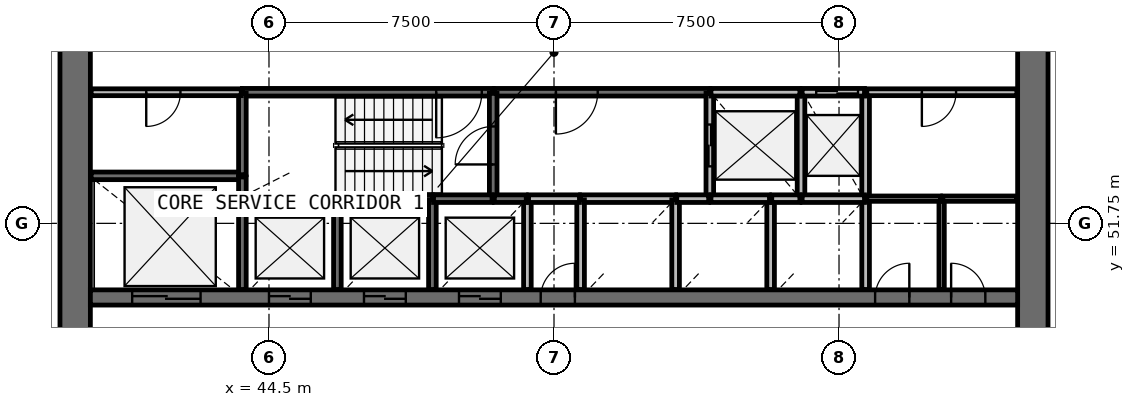
"""IFC4 building model, lengths in metres.
Left out: names, types, materials, properties, quantities, classifications, styles, units other than length and angle.
Written with IfcOpenShell. Run it as: python <this file> out.ifc"""

import sys

from ifc_helpers import new_model, si_unit, direction, frame, frame_2d, origin, place, context, subcontext, project, spatial, rectangle, extrude, source, transform, mapped, element, fill, save


model = new_model("IFC4")
c1 = context("Model", 3, precision=1e-05, world=origin(), true_north=direction((0.0, 1.0)))
c2 = subcontext(c1, "Body", "Model", "MODEL_VIEW")
j1 = project(units=[si_unit("LENGTHUNIT", "METRE"), si_unit("PLANEANGLEUNIT", "RADIAN")], contexts=[c1])
p1 = place(None, origin())
s1 = spatial("IfcSite", under=j1, at=p1, CompositionType="ELEMENT")
p2 = place(p1, origin())
s2 = spatial("IfcBuilding", under=s1, at=p2, CompositionType="ELEMENT")
p3 = place(p2, frame((0.0, 0.0, 92.1)))
s3 = spatial("IfcBuildingStorey", under=s2, at=p3, CompositionType="ELEMENT", Elevation=92.1)
p4 = place(p3, frame((64.6, 38.0, 0.0), z_axis=(0.0, 0.0, 1.0), x_axis=(0.0, 1.0, 0.0)))
e1 = element("IfcWall", 1, at=p4, inside=s3, PredefinedType="SHEAR", context=c2, shape_type="SweptSolid", body=[
    extrude(rectangle(XDim=20.0, YDim=0.8, at=frame_2d((10.0, 0.0))), origin(), (0.0, 0.0, 1.0), 4.1),
])
p5 = place(p4, frame((9.1, 0.0, 0.0)))
e2 = element("IfcOpeningElement", 2, at=p5, cuts=e1, PredefinedType="OPENING", context=c2, shape_type="SweptSolid", body=[
    extrude(rectangle(XDim=1.8, YDim=2.1, at=frame_2d((0.9, 1.05))), frame((0.0, 0.41, 0.0), z_axis=(0.0, -1.0, 0.0), x_axis=(1.0, 0.0, 0.0)), (0.0, 0.0, 1.0), 0.82),
])
p6 = place(p3, frame((39.4, 58.0, 0.0), z_axis=(0.0, 0.0, 1.0), x_axis=(0.0, -1.0, 0.0)))
e3 = element("IfcWall", 3, at=p6, inside=s3, PredefinedType="SHEAR", context=c2, shape_type="SweptSolid", body=[
    extrude(rectangle(XDim=20.0, YDim=0.8, at=frame_2d((10.0, 0.0))), origin(), (0.0, 0.0, 1.0), 4.1),
])
p7 = place(p6, frame((9.1, 0.0, 0.0)))
e4 = element("IfcOpeningElement", 4, at=p7, cuts=e3, PredefinedType="OPENING", context=c2, shape_type="SweptSolid", body=[
    extrude(rectangle(XDim=1.8, YDim=2.1, at=frame_2d((0.9, 1.05))), frame((0.0, 0.41, 0.0), z_axis=(0.0, -1.0, 0.0), x_axis=(1.0, 0.0, 0.0)), (0.0, 0.0, 1.0), 0.82),
])
p8 = place(p3, frame((39.8, 49.8, 0.0), z_axis=(0.0, 0.0, 1.0), x_axis=(1.0, 0.0, 0.0)))
e5 = element("IfcWall", 5, at=p8, inside=s3, PredefinedType="SHEAR", context=c2, shape_type="SweptSolid", body=[
    extrude(rectangle(XDim=24.4, YDim=0.4, at=frame_2d((12.2, 0.0))), origin(), (0.0, 0.0, 1.0), 4.1),
])
p9 = place(p8, frame((4.7, 0.0, 0.0)))
e6 = element("IfcOpeningElement", 6, at=p9, cuts=e5, PredefinedType="OPENING", context=c2, shape_type="SweptSolid", body=[
    extrude(rectangle(XDim=1.1, YDim=2.1, at=frame_2d((0.55, 1.05))), frame((0.0, 0.21, 0.0), z_axis=(0.0, -1.0, 0.0), x_axis=(1.0, 0.0, 0.0)), (0.0, 0.0, 1.0), 0.42),
])
p10 = place(p8, frame((7.2, 0.0, 0.0)))
e7 = element("IfcOpeningElement", 7, at=p10, cuts=e5, PredefinedType="OPENING", context=c2, shape_type="SweptSolid", body=[
    extrude(rectangle(XDim=1.1, YDim=2.1, at=frame_2d((0.55, 1.05))), frame((0.0, 0.21, 0.0), z_axis=(0.0, -1.0, 0.0), x_axis=(1.0, 0.0, 0.0)), (0.0, 0.0, 1.0), 0.42),
])
p11 = place(p8, frame((9.7, 0.0, 0.0)))
e8 = element("IfcOpeningElement", 8, at=p11, cuts=e5, PredefinedType="OPENING", context=c2, shape_type="SweptSolid", body=[
    extrude(rectangle(XDim=1.1, YDim=2.1, at=frame_2d((0.55, 1.05))), frame((0.0, 0.21, 0.0), z_axis=(0.0, -1.0, 0.0), x_axis=(1.0, 0.0, 0.0)), (0.0, 0.0, 1.0), 0.42),
])
p12 = place(p8, frame((1.1, 0.0, 0.0)))
e9 = element("IfcOpeningElement", 9, at=p12, cuts=e5, PredefinedType="OPENING", context=c2, shape_type="SweptSolid", body=[
    extrude(rectangle(XDim=1.8, YDim=2.4, at=frame_2d((0.9, 1.2))), frame((0.0, 0.21, 0.0), z_axis=(0.0, -1.0, 0.0), x_axis=(1.0, 0.0, 0.0)), (0.0, 0.0, 1.0), 0.42),
])
p13 = place(p8, frame((20.65, 0.0, 0.0)))
e10 = element("IfcOpeningElement", 10, at=p13, cuts=e5, PredefinedType="OPENING", context=c2, shape_type="SweptSolid", body=[
    extrude(rectangle(XDim=0.9, YDim=2.1, at=frame_2d((0.45, 1.05))), frame((0.0, 0.21, 0.0), z_axis=(0.0, -1.0, 0.0), x_axis=(1.0, 0.0, 0.0)), (0.0, 0.0, 1.0), 0.42),
])
p14 = place(p8, frame((22.65, 0.0, 0.0)))
e11 = element("IfcOpeningElement", 11, at=p14, cuts=e5, PredefinedType="OPENING", context=c2, shape_type="SweptSolid", body=[
    extrude(rectangle(XDim=0.9, YDim=2.1, at=frame_2d((0.45, 1.05))), frame((0.0, 0.21, 0.0), z_axis=(0.0, -1.0, 0.0), x_axis=(1.0, 0.0, 0.0)), (0.0, 0.0, 1.0), 0.42),
])
p15 = place(p8, frame((11.85, 0.0, 0.0)))
e12 = element("IfcOpeningElement", 12, at=p15, cuts=e5, PredefinedType="OPENING", context=c2, shape_type="SweptSolid", body=[
    extrude(rectangle(XDim=0.9, YDim=2.1, at=frame_2d((0.45, 1.05))), frame((0.0, 0.21, 0.0), z_axis=(0.0, -1.0, 0.0), x_axis=(1.0, 0.0, 0.0)), (0.0, 0.0, 1.0), 0.42),
])
p16 = place(p3, frame((50.4, 55.2, 0.0), z_axis=(0.0, 0.0, 1.0), x_axis=(-1.0, 0.0, 0.0)))
e13 = element("IfcWall", 13, at=p16, inside=s3, PredefinedType="SOLIDWALL", context=c2, shape_type="SweptSolid", body=[
    extrude(rectangle(XDim=6.6, YDim=0.2, at=frame_2d((3.3, 0.0))), origin(), (0.0, 0.0, 1.0), 3.7),
])
p17 = place(p16, frame((0.3, 0.0, 0.0)))
e14 = element("IfcOpeningElement", 14, at=p17, cuts=e13, PredefinedType="OPENING", context=c2, shape_type="SweptSolid", body=[
    extrude(rectangle(XDim=1.2, YDim=2.1, at=frame_2d((0.6, 1.05))), frame((0.0, 0.11, 0.0), z_axis=(0.0, -1.0, 0.0), x_axis=(1.0, 0.0, 0.0)), (0.0, 0.0, 1.0), 0.22),
])
p18 = place(p3, frame((56.1, 55.2, 0.0), z_axis=(0.0, 0.0, 1.0), x_axis=(-1.0, 0.0, 0.0)))
e15 = element("IfcWall", 15, at=p18, inside=s3, PredefinedType="SOLIDWALL", context=c2, shape_type="SweptSolid", body=[
    extrude(rectangle(XDim=5.67, YDim=0.2, at=frame_2d((2.835, 0.0))), origin(), (0.0, 0.0, 1.0), 3.7),
])
p19 = place(p18, frame((2.95, 0.0, 0.0)))
e16 = element("IfcOpeningElement", 16, at=p19, cuts=e15, PredefinedType="OPENING", context=c2, shape_type="SweptSolid", body=[
    extrude(rectangle(XDim=1.1, YDim=2.1, at=frame_2d((0.55, 1.05))), frame((0.0, 0.11, 0.0), z_axis=(0.0, -1.0, 0.0), x_axis=(1.0, 0.0, 0.0)), (0.0, 0.0, 1.0), 0.22),
])
p20 = place(p3, frame((43.8, 53.0, 0.0), z_axis=(0.0, 0.0, 1.0), x_axis=(-1.0, 0.0, 0.0)))
e17 = element("IfcWall", 17, at=p20, inside=s3, PredefinedType="SOLIDWALL", context=c2, shape_type="SweptSolid", body=[
    extrude(rectangle(XDim=3.98, YDim=0.2, at=frame_2d((1.99, 0.0))), origin(), (0.0, 0.0, 1.0), 3.7),
])
p21 = place(p3, frame((50.4, 52.4, 0.0), z_axis=(0.0, 0.0, 1.0), x_axis=(0.0, 1.0, 0.0)))
e18 = element("IfcWall", 18, at=p21, inside=s3, PredefinedType="SOLIDWALL", context=c2, shape_type="SweptSolid", body=[
    extrude(rectangle(XDim=2.77, YDim=0.2, at=frame_2d((1.385, 0.0))), origin(), (0.0, 0.0, 1.0), 3.7),
])
p22 = place(p21, frame((0.9, 0.0, 0.0)))
e19 = element("IfcOpeningElement", 19, at=p22, cuts=e18, PredefinedType="OPENING", context=c2, shape_type="SweptSolid", body=[
    extrude(rectangle(XDim=1.0, YDim=2.1, at=frame_2d((0.5, 1.05))), frame((0.0, 0.11, 0.0), z_axis=(0.0, -1.0, 0.0), x_axis=(1.0, 0.0, 0.0)), (0.0, 0.0, 1.0), 0.22),
])
p23 = place(p3, frame((56.1, 55.17, 0.0), z_axis=(0.0, 0.0, 1.0), x_axis=(0.0, -1.0, 0.0)))
e20 = element("IfcWall", 20, at=p23, inside=s3, PredefinedType="SOLIDWALL", context=c2, shape_type="SweptSolid", body=[
    extrude(rectangle(XDim=2.77, YDim=0.2, at=frame_2d((1.385, 0.0))), origin(), (0.0, 0.0, 1.0), 3.7),
])
p24 = place(p23, frame((0.82, 0.0, 0.0)))
e21 = element("IfcOpeningElement", 21, at=p24, cuts=e20, PredefinedType="OPENING", context=c2, shape_type="SweptSolid", body=[
    extrude(rectangle(XDim=1.1, YDim=2.1, at=frame_2d((0.55, 1.05))), frame((0.0, 0.11, 0.0), z_axis=(0.0, -1.0, 0.0), x_axis=(1.0, 0.0, 0.0)), (0.0, 0.0, 1.0), 0.22),
])
for number, where, z_axis, x_axis in (
    (22, (58.5, 52.4, 0.0), (0.0, 0.0, 1.0), (0.0, 1.0, 0.0)),
    (23, (60.2, 52.4, 0.0), (0.0, 0.0, 1.0), (0.0, 1.0, 0.0)),
):
    element("IfcWall", number, at=place(p3, frame(where, z_axis=z_axis, x_axis=x_axis)), inside=s3, PredefinedType="SOLIDWALL", context=c2, shape_type="SweptSolid", body=[
        extrude(rectangle(XDim=2.8, YDim=0.2, at=frame_2d((1.4, 0.0))), origin(), (0.0, 0.0, 1.0), 3.7),
    ])
p25 = place(p3, frame((46.3, 52.4, 0.0), z_axis=(0.0, 0.0, 1.0), x_axis=(-1.0, 0.0, 0.0)))
e24 = element("IfcWall", 24, at=p25, inside=s3, PredefinedType="SOLIDWALL", context=c2, shape_type="SweptSolid", body=[
    extrude(rectangle(XDim=2.5, YDim=0.2, at=frame_2d((1.25, 0.0))), origin(), (0.0, 0.0, 1.0), 3.7),
])
p26 = place(p3, frame((48.8, 52.4, 0.0), z_axis=(0.0, 0.0, 1.0), x_axis=(-1.0, 0.0, 0.0)))
e25 = element("IfcWall", 25, at=p26, inside=s3, PredefinedType="SOLIDWALL", context=c2, shape_type="SweptSolid", body=[
    extrude(rectangle(XDim=2.47, YDim=0.2, at=frame_2d((1.235, 0.0))), origin(), (0.0, 0.0, 1.0), 3.7),
])
p27 = place(p3, frame((55.2, 52.4, 0.0), z_axis=(0.0, 0.0, 1.0), x_axis=(-1.0, 0.0, 0.0)))
e26 = element("IfcWall", 26, at=p27, inside=s3, PredefinedType="SOLIDWALL", context=c2, shape_type="SweptSolid", body=[
    extrude(rectangle(XDim=2.5, YDim=0.2, at=frame_2d((1.25, 0.0))), origin(), (0.0, 0.0, 1.0), 3.7),
])
p28 = place(p3, frame((58.47, 55.2, 0.0), z_axis=(0.0, 0.0, 1.0), x_axis=(-1.0, 0.0, 0.0)))
e27 = element("IfcWall", 27, at=p28, inside=s3, PredefinedType="SOLIDWALL", context=c2, shape_type="SweptSolid", body=[
    extrude(rectangle(XDim=2.34, YDim=0.2, at=frame_2d((1.17, 0.0))), origin(), (0.0, 0.0, 1.0), 3.7),
])
for number, where, z_axis, x_axis in (
    (28, (43.8, 52.37, 0.0), (0.0, 0.0, 1.0), (0.0, -1.0, 0.0)),
    (29, (46.3, 50.01, 0.0), (0.0, 0.0, 1.0), (0.0, 1.0, 0.0)),
    (30, (48.8, 50.01, 0.0), (0.0, 0.0, 1.0), (0.0, 1.0, 0.0)),
):
    element("IfcWall", number, at=place(p3, frame(where, z_axis=z_axis, x_axis=x_axis)), inside=s3, PredefinedType="SOLIDWALL", context=c2, shape_type="SweptSolid", body=[
        extrude(rectangle(XDim=2.36, YDim=0.2, at=frame_2d((1.18, 0.0))), origin(), (0.0, 0.0, 1.0), 3.7),
    ])
p29 = place(p3, frame((51.3, 50.01, 0.0), z_axis=(0.0, 0.0, 1.0), x_axis=(0.0, 1.0, 0.0)))
e31 = element("IfcWall", 31, at=p29, inside=s3, PredefinedType="SOLIDWALL", context=c2, shape_type="SweptSolid", body=[
    extrude(rectangle(XDim=2.39, YDim=0.2, at=frame_2d((1.195, 0.0))), origin(), (0.0, 0.0, 1.0), 3.7),
])
for number, where, z_axis, x_axis in (
    (32, (52.7, 52.37, 0.0), (0.0, 0.0, 1.0), (0.0, -1.0, 0.0)),
    (33, (55.2, 50.01, 0.0), (0.0, 0.0, 1.0), (0.0, 1.0, 0.0)),
):
    element("IfcWall", number, at=place(p3, frame(where, z_axis=z_axis, x_axis=x_axis)), inside=s3, PredefinedType="SOLIDWALL", context=c2, shape_type="SweptSolid", body=[
        extrude(rectangle(XDim=2.36, YDim=0.2, at=frame_2d((1.18, 0.0))), origin(), (0.0, 0.0, 1.0), 3.7),
    ])
p30 = place(p3, frame((57.7, 50.01, 0.0), z_axis=(0.0, 0.0, 1.0), x_axis=(0.0, 1.0, 0.0)))
e34 = element("IfcWall", 34, at=p30, inside=s3, PredefinedType="SOLIDWALL", context=c2, shape_type="SweptSolid", body=[
    extrude(rectangle(XDim=2.39, YDim=0.2, at=frame_2d((1.195, 0.0))), origin(), (0.0, 0.0, 1.0), 3.7),
])
p31 = place(p3, frame((60.2, 50.01, 0.0), z_axis=(0.0, 0.0, 1.0), x_axis=(0.0, 1.0, 0.0)))
e35 = element("IfcWall", 35, at=p31, inside=s3, PredefinedType="SOLIDWALL", context=c2, shape_type="SweptSolid", body=[
    extrude(rectangle(XDim=2.36, YDim=0.2, at=frame_2d((1.18, 0.0))), origin(), (0.0, 0.0, 1.0), 3.7),
])
p32 = place(p3, frame((43.8, 55.17, 0.0), z_axis=(0.0, 0.0, 1.0), x_axis=(0.0, -1.0, 0.0)))
e36 = element("IfcWall", 36, at=p32, inside=s3, PredefinedType="SOLIDWALL", context=c2, shape_type="SweptSolid", body=[
    extrude(rectangle(XDim=2.14, YDim=0.2, at=frame_2d((1.07, 0.0))), origin(), (0.0, 0.0, 1.0), 3.7),
])
p33 = place(p3, frame((60.17, 52.4, 0.0), z_axis=(0.0, 0.0, 1.0), x_axis=(-1.0, 0.0, 0.0)))
e37 = element("IfcWall", 37, at=p33, inside=s3, PredefinedType="SOLIDWALL", context=c2, shape_type="SweptSolid", body=[
    extrude(rectangle(XDim=1.64, YDim=0.2, at=frame_2d((0.82, 0.0))), origin(), (0.0, 0.0, 1.0), 3.7),
])
p34 = place(p3, frame((60.17, 55.2, 0.0), z_axis=(0.0, 0.0, 1.0), x_axis=(-1.0, 0.0, 0.0)))
e38 = element("IfcWall", 38, at=p34, inside=s3, PredefinedType="SOLIDWALL", context=c2, shape_type="SweptSolid", body=[
    extrude(rectangle(XDim=1.64, YDim=0.2, at=frame_2d((0.82, 0.0))), origin(), (0.0, 0.0, 1.0), 3.7),
])
p35 = place(p34, frame((0.17, 0.0, 0.0)))
e39 = element("IfcOpeningElement", 39, at=p35, cuts=e38, PredefinedType="OPENING", context=c2, shape_type="SweptSolid", body=[
    extrude(rectangle(XDim=1.1, YDim=2.1, at=frame_2d((0.55, 1.05))), frame((0.0, 0.11, 0.0), z_axis=(0.0, -1.0, 0.0), x_axis=(1.0, 0.0, 0.0)), (0.0, 0.0, 1.0), 0.22),
])
for number, where, z_axis, x_axis in (
    (40, (50.37, 52.4, 0.0), (0.0, 0.0, 1.0), (-1.0, 0.0, 0.0)),
    (41, (57.67, 52.4, 0.0), (0.0, 0.0, 1.0), (-1.0, 0.0, 0.0)),
):
    element("IfcWall", number, at=place(p3, frame(where, z_axis=z_axis, x_axis=x_axis)), inside=s3, PredefinedType="SOLIDWALL", context=c2, shape_type="SweptSolid", body=[
        extrude(rectangle(XDim=1.54, YDim=0.2, at=frame_2d((0.77, 0.0))), origin(), (0.0, 0.0, 1.0), 3.7),
    ])
p36 = place(p3, frame((51.33, 52.4, 0.0), z_axis=(0.0, 0.0, 1.0), x_axis=(1.0, 0.0, 0.0)))
e42 = element("IfcWall", 42, at=p36, inside=s3, PredefinedType="SOLIDWALL", context=c2, shape_type="SweptSolid", body=[
    extrude(rectangle(XDim=1.34, YDim=0.2, at=frame_2d((0.67, 0.0))), origin(), (0.0, 0.0, 1.0), 3.7),
])
for number, where, z_axis, x_axis in (
    (43, (51.27, 52.4, 0.0), (0.0, 0.0, 1.0), (-1.0, 0.0, 0.0)),
    (44, (56.07, 52.4, 0.0), (0.0, 0.0, 1.0), (-1.0, 0.0, 0.0)),
):
    element("IfcWall", number, at=place(p3, frame(where, z_axis=z_axis, x_axis=x_axis)), inside=s3, PredefinedType="SOLIDWALL", context=c2, shape_type="SweptSolid", body=[
        extrude(rectangle(XDim=0.84, YDim=0.2, at=frame_2d((0.42, 0.0))), origin(), (0.0, 0.0, 1.0), 3.7),
    ])
p37 = place(p3, frame((58.47, 52.4, 0.0), z_axis=(0.0, 0.0, 1.0), x_axis=(-1.0, 0.0, 0.0)))
e45 = element("IfcWall", 45, at=p37, inside=s3, PredefinedType="SOLIDWALL", context=c2, shape_type="SweptSolid", body=[
    extrude(rectangle(XDim=0.74, YDim=0.2, at=frame_2d((0.37, 0.0))), origin(), (0.0, 0.0, 1.0), 3.7),
])
p38 = place(p3, frame((43.8, 52.43, 0.0), z_axis=(0.0, 0.0, 1.0), x_axis=(0.0, 1.0, 0.0)))
e46 = element("IfcWall", 46, at=p38, inside=s3, PredefinedType="SOLIDWALL", context=c2, shape_type="SweptSolid", body=[
    extrude(rectangle(XDim=0.54, YDim=0.2, at=frame_2d((0.27, 0.0))), origin(), (0.0, 0.0, 1.0), 3.7),
])
p39 = place(p3, frame((64.18, 55.2, 0.0), z_axis=(0.0, 0.0, 1.0), x_axis=(-1.0, 0.0, 0.0)))
e47 = element("IfcWall", 47, at=p39, inside=s3, PredefinedType="PARTITIONING", context=c2, shape_type="SweptSolid", body=[
    extrude(rectangle(XDim=3.95, YDim=0.18, at=frame_2d((1.975, 0.0))), origin(), (0.0, 0.0, 1.0), 3.7),
])
p40 = place(p39, frame((1.6, 0.0, 0.0)))
e48 = element("IfcOpeningElement", 48, at=p40, cuts=e47, PredefinedType="OPENING", context=c2, shape_type="SweptSolid", body=[
    extrude(rectangle(XDim=0.9, YDim=2.1, at=frame_2d((0.45, 1.05))), frame((0.0, 0.1, 0.0), z_axis=(0.0, -1.0, 0.0), x_axis=(1.0, 0.0, 0.0)), (0.0, 0.0, 1.0), 0.2),
])
p41 = place(p3, frame((43.77, 55.2, 0.0), z_axis=(0.0, 0.0, 1.0), x_axis=(-1.0, 0.0, 0.0)))
e49 = element("IfcWall", 49, at=p41, inside=s3, PredefinedType="PARTITIONING", context=c2, shape_type="SweptSolid", body=[
    extrude(rectangle(XDim=3.95, YDim=0.18, at=frame_2d((1.975, 0.0))), origin(), (0.0, 0.0, 1.0), 3.7),
])
p42 = place(p41, frame((1.6, 0.0, 0.0)))
e50 = element("IfcOpeningElement", 50, at=p42, cuts=e49, PredefinedType="OPENING", context=c2, shape_type="SweptSolid", body=[
    extrude(rectangle(XDim=0.9, YDim=2.1, at=frame_2d((0.45, 1.05))), frame((0.0, 0.1, 0.0), z_axis=(0.0, -1.0, 0.0), x_axis=(1.0, 0.0, 0.0)), (0.0, 0.0, 1.0), 0.2),
])
p43 = place(p3, frame((62.2, 50.01, 0.0), z_axis=(0.0, 0.0, 1.0), x_axis=(0.0, 1.0, 0.0)))
e51 = element("IfcWall", 51, at=p43, inside=s3, PredefinedType="PARTITIONING", context=c2, shape_type="SweptSolid", body=[
    extrude(rectangle(XDim=2.39, YDim=0.14, at=frame_2d((1.195, 0.0))), origin(), (0.0, 0.0, 1.0), 2.9),
])
p44 = place(p3, frame((62.17, 52.4, 0.0), z_axis=(0.0, 0.0, 1.0), x_axis=(-1.0, 0.0, 0.0)))
e52 = element("IfcWall", 52, at=p44, inside=s3, PredefinedType="PARTITIONING", context=c2, shape_type="SweptSolid", body=[
    extrude(rectangle(XDim=1.94, YDim=0.14, at=frame_2d((0.97, 0.0))), origin(), (0.0, 0.0, 1.0), 2.9),
])
p45 = place(p3, frame((64.18, 52.4, 0.0), z_axis=(0.0, 0.0, 1.0), x_axis=(-1.0, 0.0, 0.0)))
e53 = element("IfcWall", 53, at=p45, inside=s3, PredefinedType="PARTITIONING", context=c2, shape_type="SweptSolid", body=[
    extrude(rectangle(XDim=1.95, YDim=0.14, at=frame_2d((0.975, 0.0))), origin(), (0.0, 0.0, 1.0), 2.9),
])
m1 = source(origin(), c2, "Body", "SweptSolid", [
    extrude(rectangle(XDim=1.1, YDim=2.1, at=frame_2d((0.55, 1.05))), frame((0.0, 0.025, 0.0), z_axis=(0.0, -1.0, 0.0), x_axis=(1.0, 0.0, 0.0)), (0.0, 0.0, 1.0), 0.05),
])
p46 = place(p9, origin())
e54 = element("IfcDoor", 54, at=p46, inside=s3, OperationType="DOUBLE_DOOR_SLIDING", PredefinedType="USERDEFINED", context=c2, shape_type="MappedRepresentation", body=[
    mapped(m1, transform((0.0, 0.0, 0.0), scale=1.0)),
])
fill(e6, e54)
p47 = place(p10, origin())
e55 = element("IfcDoor", 55, at=p47, inside=s3, OperationType="DOUBLE_DOOR_SLIDING", PredefinedType="USERDEFINED", context=c2, shape_type="MappedRepresentation", body=[
    mapped(m1, transform((0.0, 0.0, 0.0), scale=1.0)),
])
fill(e7, e55)
p48 = place(p11, origin())
e56 = element("IfcDoor", 56, at=p48, inside=s3, OperationType="DOUBLE_DOOR_SLIDING", PredefinedType="USERDEFINED", context=c2, shape_type="MappedRepresentation", body=[
    mapped(m1, transform((0.0, 0.0, 0.0), scale=1.0)),
])
fill(e8, e56)
p49 = place(p24, origin())
e57 = element("IfcDoor", 57, at=p49, inside=s3, OperationType="DOUBLE_DOOR_SLIDING", PredefinedType="USERDEFINED", context=c2, shape_type="MappedRepresentation", body=[
    mapped(m1, transform((0.0, 0.0, 0.0), scale=1.0)),
])
fill(e21, e57)
p50 = place(p35, origin())
e58 = element("IfcDoor", 58, at=p50, inside=s3, OperationType="DOUBLE_DOOR_SLIDING", PredefinedType="USERDEFINED", context=c2, shape_type="MappedRepresentation", body=[
    mapped(m1, transform((0.0, 0.0, 0.0), scale=1.0)),
])
fill(e39, e58)
m2 = source(origin(), c2, "Body", "SweptSolid", [
    extrude(rectangle(XDim=1.8, YDim=2.4, at=frame_2d((0.9, 1.2))), frame((0.0, 0.025, 0.0), z_axis=(0.0, -1.0, 0.0), x_axis=(1.0, 0.0, 0.0)), (0.0, 0.0, 1.0), 0.05),
])
p51 = place(p12, origin())
e59 = element("IfcDoor", 59, at=p51, inside=s3, OperationType="DOUBLE_DOOR_SLIDING", PredefinedType="USERDEFINED", context=c2, shape_type="MappedRepresentation", body=[
    mapped(m2, transform((0.0, 0.0, 0.0), scale=1.0)),
])
fill(e9, e59)
m3 = source(origin(), c2, "Body", "SweptSolid", [
    extrude(rectangle(XDim=1.2, YDim=2.1, at=frame_2d((0.6, 1.05))), frame((0.0, 0.025, 0.0), z_axis=(0.0, -1.0, 0.0), x_axis=(1.0, 0.0, 0.0)), (0.0, 0.0, 1.0), 0.05),
])
p52 = place(p17, origin())
e60 = element("IfcDoor", 60, at=p52, inside=s3, OperationType="SINGLE_SWING_RIGHT", PredefinedType="DOOR", context=c2, shape_type="MappedRepresentation", body=[
    mapped(m3, transform((0.0, 0.0, 0.0), scale=1.0)),
])
fill(e14, e60)
m4 = source(origin(), c2, "Body", "SweptSolid", [
    extrude(rectangle(XDim=1.0, YDim=2.1, at=frame_2d((0.5, 1.05))), frame((0.0, 0.025, 0.0), z_axis=(0.0, -1.0, 0.0), x_axis=(1.0, 0.0, 0.0)), (0.0, 0.0, 1.0), 0.05),
])
p53 = place(p22, origin())
e61 = element("IfcDoor", 61, at=p53, inside=s3, OperationType="SINGLE_SWING_LEFT", PredefinedType="DOOR", context=c2, shape_type="MappedRepresentation", body=[
    mapped(m4, transform((0.0, 0.0, 0.0), scale=1.0)),
])
fill(e19, e61)
m5 = source(origin(), c2, "Body", "SweptSolid", [
    extrude(rectangle(XDim=1.1, YDim=2.1, at=frame_2d((0.55, 1.05))), frame((0.0, 0.025, 0.0), z_axis=(0.0, -1.0, 0.0), x_axis=(1.0, 0.0, 0.0)), (0.0, 0.0, 1.0), 0.05),
])
p54 = place(p19, origin())
e62 = element("IfcDoor", 62, at=p54, inside=s3, OperationType="SINGLE_SWING_RIGHT", PredefinedType="DOOR", context=c2, shape_type="MappedRepresentation", body=[
    mapped(m5, transform((0.0, 0.0, 0.0), scale=1.0)),
])
fill(e16, e62)
m6 = source(origin(), c2, "Body", "SweptSolid", [
    extrude(rectangle(XDim=0.9, YDim=2.1, at=frame_2d((0.45, 1.05))), frame((0.0, 0.025, 0.0), z_axis=(0.0, -1.0, 0.0), x_axis=(1.0, 0.0, 0.0)), (0.0, 0.0, 1.0), 0.05),
])
p55 = place(p42, origin())
e63 = element("IfcDoor", 63, at=p55, inside=s3, OperationType="SINGLE_SWING_RIGHT", PredefinedType="DOOR", context=c2, shape_type="MappedRepresentation", body=[
    mapped(m6, transform((0.0, 0.0, 0.0), scale=1.0)),
])
fill(e50, e63)
p56 = place(p13, origin())
e64 = element("IfcDoor", 64, at=p56, inside=s3, OperationType="SINGLE_SWING_RIGHT", PredefinedType="DOOR", context=c2, shape_type="MappedRepresentation", body=[
    mapped(m6, transform((0.0, 0.0, 0.0), scale=1.0)),
])
fill(e10, e64)
p57 = place(p14, origin())
e65 = element("IfcDoor", 65, at=p57, inside=s3, OperationType="SINGLE_SWING_LEFT", PredefinedType="DOOR", context=c2, shape_type="MappedRepresentation", body=[
    mapped(m6, transform((0.0, 0.0, 0.0), scale=1.0)),
])
fill(e11, e65)
p58 = place(p40, origin())
e66 = element("IfcDoor", 66, at=p58, inside=s3, OperationType="SINGLE_SWING_RIGHT", PredefinedType="DOOR", context=c2, shape_type="MappedRepresentation", body=[
    mapped(m6, transform((0.0, 0.0, 0.0), scale=1.0)),
])
fill(e48, e66)
p59 = place(p15, origin())
e67 = element("IfcDoor", 67, at=p59, inside=s3, OperationType="SINGLE_SWING_RIGHT", PredefinedType="DOOR", context=c2, shape_type="MappedRepresentation", body=[
    mapped(m6, transform((0.0, 0.0, 0.0), scale=1.0)),
])
fill(e12, e67)
save(model, sys.argv[1])
